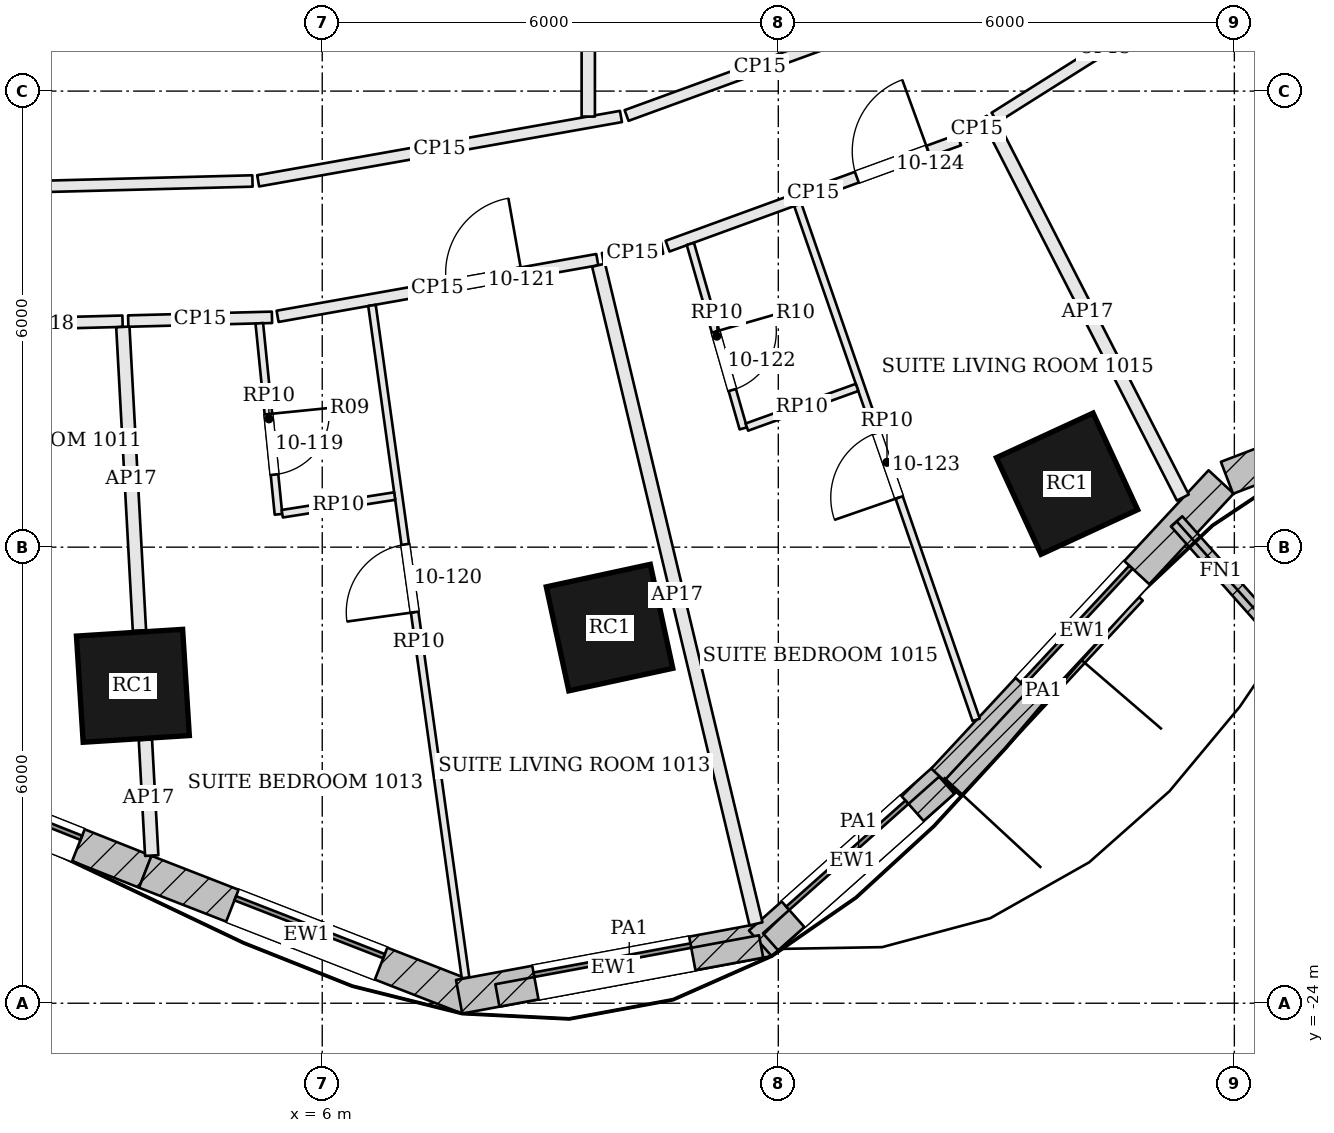
"""IFC4 building model, lengths in metres.
Left out: names, types, materials, properties, quantities, classifications, styles, units other than length and angle.
Written with IfcOpenShell. Run it as: python <this file> out.ifc"""

import sys

from ifc_helpers import new_model, si_unit, direction, frame, frame_2d, origin, origin_2d, place, context, subcontext, project, spatial, rectangle, extrude, element, fill, save


model = new_model("IFC4")
c1 = context("Model", 3, precision=1e-05, world=origin(), true_north=direction((0.0, 1.0)))
c2 = subcontext(c1, "Body", "Model", "MODEL_VIEW")
j1 = project(units=[si_unit("LENGTHUNIT", "METRE"), si_unit("PLANEANGLEUNIT", "RADIAN")], contexts=[c1])
p1 = place(None, origin())
s1 = spatial("IfcSite", under=j1, at=p1, CompositionType="ELEMENT")
p2 = place(p1, origin())
s2 = spatial("IfcBuilding", under=s1, at=p2, CompositionType="ELEMENT")
p3 = place(p2, frame((0.0, 0.0, 51.9)))
s3 = spatial("IfcBuildingStorey", under=s2, at=p3, CompositionType="ELEMENT", Elevation=51.9)
for number, where, z_axis, x_axis in (
    (1, (3.509, -19.824, 0.0), (0.0, 0.0, 1.0), (0.998, 0.063, 0.0)),
    (2, (9.78, -19.058, 0.0), (0.0, 0.0, 1.0), (0.977, 0.211, 0.0)),
    (3, (15.799, -17.165, 0.0), (0.0, 0.0, 1.0), (0.908, 0.419, 0.0)),
):
    element("IfcColumn", number, at=place(p3, frame(where, z_axis=z_axis, x_axis=x_axis)), inside=s3, PredefinedType="COLUMN", context=c2, shape_type="SweptSolid", body=[
        extrude(rectangle(XDim=1.4, YDim=1.4, at=origin_2d()), origin(), (0.0, 0.0, 1.0), 3.6),
    ])
p4 = place(p3, frame((-0.041, -20.798, 0.0), z_axis=(0.0, 0.0, 1.0), x_axis=(0.929539262027, -0.368723148649, 0.0)))
e4 = element("IfcWall", 4, at=p4, inside=s3, PredefinedType="SOLIDWALL", context=c2, shape_type="SweptSolid", body=[
    extrude(rectangle(XDim=3.995, YDim=0.45, at=frame_2d((1.997, 0.0))), origin(), (0.0, 0.0, 1.0), 3.4),
])
p5 = place(p4, frame((0.947, 0.0, 0.9)))
e5 = element("IfcOpeningElement", 5, at=p5, cuts=e4, PredefinedType="OPENING", context=c2, shape_type="SweptSolid", body=[
    extrude(rectangle(XDim=2.1, YDim=2.0, at=frame_2d((1.05, 1.0))), frame((0.0, 0.235, 0.0), z_axis=(0.0, -1.0, 0.0), x_axis=(1.0, 0.0, 0.0)), (0.0, 0.0, 1.0), 0.47),
])
p6 = place(p3, frame((3.672, -22.27, 0.0), z_axis=(0.0, 0.0, 1.0), x_axis=(0.931791503167, -0.36299393194, 0.0)))
e6 = element("IfcWall", 6, at=p6, inside=s3, PredefinedType="SOLIDWALL", context=c2, shape_type="SweptSolid", body=[
    extrude(rectangle(XDim=4.56, YDim=0.45, at=frame_2d((2.28, 0.0))), origin(), (0.0, 0.0, 1.0), 3.4),
])
p7 = place(p6, frame((1.23, 0.0, 0.9)))
e7 = element("IfcOpeningElement", 7, at=p7, cuts=e6, PredefinedType="OPENING", context=c2, shape_type="SweptSolid", body=[
    extrude(rectangle(XDim=2.1, YDim=2.0, at=frame_2d((1.05, 1.0))), frame((0.0, 0.235, 0.0), z_axis=(0.0, -1.0, 0.0), x_axis=(1.0, 0.0, 0.0)), (0.0, 0.0, 1.0), 0.47),
])
p8 = place(p3, frame((7.801, -23.915, 0.0), z_axis=(0.0, 0.0, 1.0), x_axis=(0.983186467795, 0.182604407242, 0.0)))
e8 = element("IfcWall", 8, at=p8, inside=s3, PredefinedType="SOLIDWALL", context=c2, shape_type="SweptSolid", body=[
    extrude(rectangle(XDim=4.141, YDim=0.45, at=frame_2d((2.07, 0.0))), origin(), (0.0, 0.0, 1.0), 3.4),
])
p9 = place(p8, frame((1.02, 0.0, 0.9)))
e9 = element("IfcOpeningElement", 9, at=p9, cuts=e8, PredefinedType="OPENING", context=c2, shape_type="SweptSolid", body=[
    extrude(rectangle(XDim=2.1, YDim=2.0, at=frame_2d((1.05, 1.0))), frame((0.0, 0.235, 0.0), z_axis=(0.0, -1.0, 0.0), x_axis=(1.0, 0.0, 0.0)), (0.0, 0.0, 1.0), 0.47),
])
p10 = place(p3, frame((11.763, -23.212, 0.0), z_axis=(0.0, 0.0, 1.0), x_axis=(0.74723528797, 0.664559571755, 0.0)))
e10 = element("IfcWall", 10, at=p10, inside=s3, PredefinedType="SOLIDWALL", context=c2, shape_type="SweptSolid", body=[
    extrude(rectangle(XDim=3.251, YDim=0.45, at=frame_2d((1.625, 0.0))), origin(), (0.0, 0.0, 1.0), 3.4),
])
p11 = place(p10, frame((0.576, 0.0, 0.9)))
e11 = element("IfcOpeningElement", 11, at=p11, cuts=e10, PredefinedType="OPENING", context=c2, shape_type="SweptSolid", body=[
    extrude(rectangle(XDim=2.1, YDim=2.0, at=frame_2d((1.05, 1.0))), frame((0.0, 0.235, 0.0), z_axis=(0.0, -1.0, 0.0), x_axis=(1.0, 0.0, 0.0)), (0.0, 0.0, 1.0), 0.47),
])
p12 = place(p3, frame((14.177, -21.066, 0.0), z_axis=(0.0, 0.0, 1.0), x_axis=(0.680847709714, 0.732425010617, 0.0)))
e12 = element("IfcWall", 12, at=p12, inside=s3, PredefinedType="SOLIDWALL", context=c2, shape_type="SweptSolid", body=[
    extrude(rectangle(XDim=5.358, YDim=0.45, at=frame_2d((2.679, 0.0))), origin(), (0.0, 0.0, 1.0), 3.4),
])
p13 = place(p12, frame((1.629, 0.0, 0.9)))
e13 = element("IfcOpeningElement", 13, at=p13, cuts=e12, PredefinedType="OPENING", context=c2, shape_type="SweptSolid", body=[
    extrude(rectangle(XDim=2.1, YDim=2.0, at=frame_2d((1.05, 1.0))), frame((0.0, 0.235, 0.0), z_axis=(0.0, -1.0, 0.0), x_axis=(1.0, 0.0, 0.0)), (0.0, 0.0, 1.0), 0.47),
])
p14 = place(p3, frame((17.903, -17.087, 0.0), z_axis=(0.0, 0.0, 1.0), x_axis=(0.934145554025, 0.356892258105, 0.0)))
e14 = element("IfcWall", 14, at=p14, inside=s3, PredefinedType="SOLIDWALL", context=c2, shape_type="SweptSolid", body=[
    extrude(rectangle(XDim=4.165, YDim=0.45, at=frame_2d((2.082, 0.0))), origin(), (0.0, 0.0, 1.0), 3.4),
])
p15 = place(p14, frame((1.032, 0.0, 0.9)))
e15 = element("IfcOpeningElement", 15, at=p15, cuts=e14, PredefinedType="OPENING", context=c2, shape_type="SweptSolid", body=[
    extrude(rectangle(XDim=2.1, YDim=2.0, at=frame_2d((1.05, 1.0))), frame((0.0, 0.235, 0.0), z_axis=(0.0, -1.0, 0.0), x_axis=(1.0, 0.0, 0.0)), (0.0, 0.0, 1.0), 0.47),
])
p16 = place(p3, frame((17.24, -17.66, 0.0), z_axis=(0.0, 0.0, 1.0), x_axis=(0.664017424016, -0.747717099312, 0.0)))
e16 = element("IfcWall", 16, at=p16, inside=s3, PredefinedType="SOLIDWALL", context=c2, shape_type="SweptSolid", body=[
    extrude(rectangle(XDim=1.75, YDim=0.2, at=frame_2d((0.875, 0.0))), origin(), (0.0, 0.0, 1.0), 3.4),
])
p17 = place(p3, frame((8.304, -23.897, 3.6), z_axis=(0.0, 0.0, 1.0), x_axis=(0.983203460001, 0.182512893356, 0.0)))
e17 = element("IfcWall", 17, at=p17, inside=s3, PredefinedType="PARAPET", context=c2, shape_type="SweptSolid", body=[
    extrude(rectangle(XDim=3.529, YDim=0.3, at=frame_2d((1.764, 0.0))), origin(), (0.0, 0.0, 1.0), 1.1),
])
p18 = place(p3, frame((11.898, -23.192, 3.6), z_axis=(0.0, 0.0, 1.0), x_axis=(0.74726596591, 0.664525075669, 0.0)))
e18 = element("IfcWall", 18, at=p18, inside=s3, PredefinedType="PARAPET", context=c2, shape_type="SweptSolid", body=[
    extrude(rectangle(XDim=3.101, YDim=0.3, at=frame_2d((1.551, 0.0))), origin(), (0.0, 0.0, 1.0), 1.1),
])
p19 = place(p3, frame((14.293, -21.174, 3.6), z_axis=(0.0, 0.0, 1.0), x_axis=(0.680821476217, 0.732449395877, 0.0)))
e19 = element("IfcWall", 19, at=p19, inside=s3, PredefinedType="PARAPET", context=c2, shape_type="SweptSolid", body=[
    extrude(rectangle(XDim=3.513, YDim=0.3, at=frame_2d((1.757, 0.0))), origin(), (0.0, 0.0, 1.0), 1.1),
])
p20 = place(p3, frame((-2.114, -15.17, 0.0), z_axis=(0.0, 0.0, 1.0), x_axis=(0.999662545619, 0.025976814392, 0.0)))
e20 = element("IfcWall", 20, at=p20, inside=s3, PredefinedType="PARTITIONING", context=c2, shape_type="SweptSolid", body=[
    extrude(rectangle(XDim=5.489, YDim=0.15, at=frame_2d((2.744, 0.0))), origin(), (0.0, 0.0, 1.0), 2.68),
])
p21 = place(p20, frame((3.402, 0.0, 0.0)))
e21 = element("IfcOpeningElement", 21, at=p21, cuts=e20, PredefinedType="OPENING", context=c2, shape_type="SweptSolid", body=[
    extrude(rectangle(XDim=1.0, YDim=2.1, at=frame_2d((0.5, 1.05))), frame((0.0, 0.085, 0.0), z_axis=(0.0, -1.0, 0.0), x_axis=(1.0, 0.0, 0.0)), (0.0, 0.0, 1.0), 0.17),
])
p22 = place(p3, frame((3.757, -22.058, 0.0), z_axis=(0.0, 0.0, 1.0), x_axis=(-0.054592188309, 0.998508734552, 0.0)))
e22 = element("IfcWall", 22, at=p22, inside=s3, PredefinedType="PARTITIONING", context=c2, shape_type="SweptSolid", body=[
    extrude(rectangle(XDim=1.525, YDim=0.175, at=frame_2d((0.762, 0.0))), origin(), (0.0, 0.0, 1.0), 2.68),
])
p23 = place(p3, frame((3.595, -19.097, 0.0), z_axis=(0.0, 0.0, 1.0), x_axis=(-0.054614936385, 0.99850749057, 0.0)))
e23 = element("IfcWall", 23, at=p23, inside=s3, PredefinedType="PARTITIONING", context=c2, shape_type="SweptSolid", body=[
    extrude(rectangle(XDim=4.001, YDim=0.175, at=frame_2d((2.0, 0.0))), origin(), (0.0, 0.0, 1.0), 2.68),
])
p24 = place(p3, frame((3.448, -15.025, 0.0), z_axis=(0.0, 0.0, 1.0), x_axis=(0.999663410965, 0.025943492008, 0.0)))
e24 = element("IfcWall", 24, at=p24, inside=s3, PredefinedType="PARTITIONING", context=c2, shape_type="SweptSolid", body=[
    extrude(rectangle(XDim=1.892, YDim=0.15, at=frame_2d((0.946, 0.0))), origin(), (0.0, 0.0, 1.0), 2.68),
])
p25 = place(p3, frame((5.413, -14.963, 0.0), z_axis=(0.0, 0.0, 1.0), x_axis=(0.984637058407, 0.174613468012, 0.0)))
e25 = element("IfcWall", 25, at=p25, inside=s3, PredefinedType="PARTITIONING", context=c2, shape_type="SweptSolid", body=[
    extrude(rectangle(XDim=4.271, YDim=0.15, at=frame_2d((2.136, 0.0))), origin(), (0.0, 0.0, 1.0), 2.68),
])
p26 = place(p25, frame((2.261, 0.0, 0.0)))
e26 = element("IfcOpeningElement", 26, at=p26, cuts=e25, PredefinedType="OPENING", context=c2, shape_type="SweptSolid", body=[
    extrude(rectangle(XDim=1.0, YDim=2.1, at=frame_2d((0.5, 1.05))), frame((0.0, 0.085, 0.0), z_axis=(0.0, -1.0, 0.0), x_axis=(1.0, 0.0, 0.0)), (0.0, 0.0, 1.0), 0.17),
])
p27 = place(p3, frame((11.707, -22.956, 0.0), z_axis=(0.0, 0.0, 1.0), x_axis=(-0.232387269729, 0.972623337612, 0.0)))
e27 = element("IfcWall", 27, at=p27, inside=s3, PredefinedType="PARTITIONING", context=c2, shape_type="SweptSolid", body=[
    extrude(rectangle(XDim=8.91, YDim=0.175, at=frame_2d((4.455, 0.0))), origin(), (0.0, 0.0, 1.0), 2.68),
])
p28 = place(p3, frame((9.692, -14.204, 0.0), z_axis=(0.0, 0.0, 1.0), x_axis=(0.984624975399, 0.174681589816, 0.0)))
e28 = element("IfcWall", 28, at=p28, inside=s3, PredefinedType="PARTITIONING", context=c2, shape_type="SweptSolid", body=[
    extrude(rectangle(XDim=0.792, YDim=0.15, at=frame_2d((0.396, 0.0))), origin(), (0.0, 0.0, 1.0), 2.68),
])
p29 = place(p3, frame((10.543, -14.04, 0.0), z_axis=(0.0, 0.0, 1.0), x_axis=(0.939576705301, 0.342338450741, 0.0)))
e29 = element("IfcWall", 29, at=p29, inside=s3, PredefinedType="PARTITIONING", context=c2, shape_type="SweptSolid", body=[
    extrude(rectangle(XDim=4.082, YDim=0.15, at=frame_2d((2.041, 0.0))), origin(), (0.0, 0.0, 1.0), 2.68),
])
p30 = place(p29, frame((2.65, 0.0, 0.0)))
e30 = element("IfcOpeningElement", 30, at=p30, cuts=e29, PredefinedType="OPENING", context=c2, shape_type="SweptSolid", body=[
    extrude(rectangle(XDim=1.0, YDim=2.1, at=frame_2d((0.5, 1.05))), frame((0.0, 0.085, 0.0), z_axis=(0.0, -1.0, 0.0), x_axis=(1.0, 0.0, 0.0)), (0.0, 0.0, 1.0), 0.17),
])
p31 = place(p3, frame((14.442, -12.603, 0.0), z_axis=(0.0, 0.0, 1.0), x_axis=(0.845806400094, 0.533489956381, 0.0)))
e31 = element("IfcWall", 31, at=p31, inside=s3, PredefinedType="PARTITIONING", context=c2, shape_type="SweptSolid", body=[
    extrude(rectangle(XDim=0.402, YDim=0.15, at=frame_2d((0.201, 0.0))), origin(), (0.0, 0.0, 1.0), 2.68),
])
p32 = place(p3, frame((17.322, -17.347, 0.0), z_axis=(0.0, 0.0, 1.0), x_axis=(-0.455844974843, 0.890059188431, 0.0)))
e32 = element("IfcWall", 32, at=p32, inside=s3, PredefinedType="PARTITIONING", context=c2, shape_type="SweptSolid", body=[
    extrude(rectangle(XDim=5.497, YDim=0.175, at=frame_2d((2.748, 0.0))), origin(), (0.0, 0.0, 1.0), 2.68),
])
p33 = place(p3, frame((14.846, -12.348, 0.0), z_axis=(0.0, 0.0, 1.0), x_axis=(0.846001508251, 0.533180502304, 0.0)))
e33 = element("IfcWall", 33, at=p33, inside=s3, PredefinedType="PARTITIONING", context=c2, shape_type="SweptSolid", body=[
    extrude(rectangle(XDim=3.438, YDim=0.15, at=frame_2d((1.719, 0.0))), origin(), (0.0, 0.0, 1.0), 2.68),
])
p34 = place(p33, frame((2.0, 0.0, 0.0)))
e34 = element("IfcOpeningElement", 34, at=p34, cuts=e33, PredefinedType="OPENING", context=c2, shape_type="SweptSolid", body=[
    extrude(rectangle(XDim=1.0, YDim=2.4, at=frame_2d((0.5, 1.2))), frame((0.0, 0.085, 0.0), z_axis=(0.0, -1.0, 0.0), x_axis=(1.0, 0.0, 0.0)), (0.0, 0.0, 1.0), 0.17),
])
p35 = place(p3, frame((13.511, -11.043, 0.0), z_axis=(0.0, 0.0, 1.0), x_axis=(-0.939583191704, -0.342320647736, 0.0)))
e35 = element("IfcWall", 35, at=p35, inside=s3, PredefinedType="PARTITIONING", context=c2, shape_type="SweptSolid", body=[
    extrude(rectangle(XDim=3.733, YDim=0.15, at=frame_2d((1.866, 0.0))), origin(), (0.0, 0.0, 1.0), 2.68),
])
p36 = place(p3, frame((9.93, -12.334, 0.0), z_axis=(0.0, 0.0, 1.0), x_axis=(-0.984638212434, -0.174606960386, 0.0)))
e36 = element("IfcWall", 36, at=p36, inside=s3, PredefinedType="PARTITIONING", context=c2, shape_type="SweptSolid", body=[
    extrude(rectangle(XDim=4.848, YDim=0.15, at=frame_2d((2.424, 0.0))), origin(), (0.0, 0.0, 1.0), 2.68),
])
p37 = place(p3, frame((5.082, -13.182, 0.0), z_axis=(0.0, 0.0, 1.0), x_axis=(-0.999661624383, -0.026012242045, 0.0)))
e37 = element("IfcWall", 37, at=p37, inside=s3, PredefinedType="PARTITIONING", context=c2, shape_type="SweptSolid", body=[
    extrude(rectangle(XDim=7.218, YDim=0.15, at=frame_2d((3.609, 0.0))), origin(), (0.0, 0.0, 1.0), 2.68),
])
p38 = place(p3, frame((7.885, -23.666, 0.0), z_axis=(0.0, 0.0, 1.0), x_axis=(-0.137792588261, 0.990461106061, 0.0)))
e38 = element("IfcWall", 38, at=p38, inside=s3, PredefinedType="PARTITIONING", context=c2, shape_type="SweptSolid", body=[
    extrude(rectangle(XDim=8.932, YDim=0.1, at=frame_2d((4.466, 0.0))), origin(), (0.0, 0.0, 1.0), 2.898),
])
p39 = place(p38, frame((4.857, 0.0, 0.0)))
e39 = element("IfcOpeningElement", 39, at=p39, cuts=e38, PredefinedType="OPENING", context=c2, shape_type="SweptSolid", body=[
    extrude(rectangle(XDim=0.9, YDim=2.4, at=frame_2d((0.45, 1.2))), frame((0.0, 0.06, 0.0), z_axis=(0.0, -1.0, 0.0), x_axis=(1.0, 0.0, 0.0)), (0.0, 0.0, 1.0), 0.12),
])
p40 = place(p3, frame((5.172, -15.055, 0.0), z_axis=(0.0, 0.0, 1.0), x_axis=(0.099972776087, -0.994990172837, 0.0)))
e40 = element("IfcWall", 40, at=p40, inside=s3, PredefinedType="PARTITIONING", context=c2, shape_type="SweptSolid", body=[
    extrude(rectangle(XDim=2.525, YDim=0.1, at=frame_2d((1.263, 0.0))), origin(), (0.0, 0.0, 1.0), 2.898),
])
p41 = place(p40, frame((1.2, 0.0, 0.0)))
e41 = element("IfcOpeningElement", 41, at=p41, cuts=e40, PredefinedType="OPENING", context=c2, shape_type="SweptSolid", body=[
    extrude(rectangle(XDim=0.8, YDim=2.1, at=frame_2d((0.4, 1.05))), frame((0.0, 0.06, 0.0), z_axis=(0.0, -1.0, 0.0), x_axis=(1.0, 0.0, 0.0)), (0.0, 0.0, 1.0), 0.12),
])
p42 = place(p3, frame((5.474, -17.56, 0.0), z_axis=(0.0, 0.0, 1.0), x_axis=(0.987901407122, 0.15508323509, 0.0)))
e42 = element("IfcWall", 42, at=p42, inside=s3, PredefinedType="PARTITIONING", context=c2, shape_type="SweptSolid", body=[
    extrude(rectangle(XDim=1.497, YDim=0.1, at=frame_2d((0.749, 0.0))), origin(), (0.0, 0.0, 1.0), 2.898),
])
p43 = place(p3, frame((14.603, -20.272, 0.0), z_axis=(0.0, 0.0, 1.0), x_axis=(-0.327236845349, 0.944942351176, 0.0)))
e43 = element("IfcWall", 43, at=p43, inside=s3, PredefinedType="PARTITIONING", context=c2, shape_type="SweptSolid", body=[
    extrude(rectangle(XDim=7.171, YDim=0.1, at=frame_2d((3.585, 0.0))), origin(), (0.0, 0.0, 1.0), 2.898),
])
p44 = place(p43, frame((3.096, 0.0, 0.0)))
e44 = element("IfcOpeningElement", 44, at=p44, cuts=e43, PredefinedType="OPENING", context=c2, shape_type="SweptSolid", body=[
    extrude(rectangle(XDim=0.9, YDim=2.4, at=frame_2d((0.45, 1.2))), frame((0.0, 0.06, 0.0), z_axis=(0.0, -1.0, 0.0), x_axis=(1.0, 0.0, 0.0)), (0.0, 0.0, 1.0), 0.12),
])
p45 = place(p3, frame((10.843, -14.01, 0.0), z_axis=(0.0, 0.0, 1.0), x_axis=(0.275653202558, -0.961257151817, 0.0)))
e45 = element("IfcWall", 45, at=p45, inside=s3, PredefinedType="PARTITIONING", context=c2, shape_type="SweptSolid", body=[
    extrude(rectangle(XDim=2.525, YDim=0.1, at=frame_2d((1.263, 0.0))), origin(), (0.0, 0.0, 1.0), 2.898),
])
p46 = place(p45, frame((1.2, 0.0, 0.0)))
e46 = element("IfcOpeningElement", 46, at=p46, cuts=e45, PredefinedType="OPENING", context=c2, shape_type="SweptSolid", body=[
    extrude(rectangle(XDim=0.8, YDim=2.1, at=frame_2d((0.4, 1.05))), frame((0.0, 0.06, 0.0), z_axis=(0.0, -1.0, 0.0), x_axis=(1.0, 0.0, 0.0)), (0.0, 0.0, 1.0), 0.12),
])
p47 = place(p3, frame((11.586, -16.421, 0.0), z_axis=(0.0, 0.0, 1.0), x_axis=(0.940820740846, 0.338904608398, 0.0)))
e47 = element("IfcWall", 47, at=p47, inside=s3, PredefinedType="PARTITIONING", context=c2, shape_type="SweptSolid", body=[
    extrude(rectangle(XDim=1.541, YDim=0.1, at=frame_2d((0.771, 0.0))), origin(), (0.0, 0.0, 1.0), 2.898),
])
p48 = place(p3, frame((9.5, -12.335, 0.0), z_axis=(0.0, 0.0, 1.0), x_axis=(0.0, 1.0, 0.0)))
e48 = element("IfcWall", 48, at=p48, inside=s3, PredefinedType="PARTITIONING", context=c2, shape_type="SweptSolid", body=[
    extrude(rectangle(XDim=7.46, YDim=0.175, at=frame_2d((3.73, 0.0))), origin(), (0.0, 0.0, 1.0), 2.68),
])
p49 = place(p5, origin())
e49 = element("IfcWindow", 49, at=p49, inside=s3, PartitioningType="SINGLE_PANEL", PredefinedType="WINDOW", context=c2, shape_type="SweptSolid", body=[
    extrude(rectangle(XDim=2.1, YDim=2.0, at=frame_2d((1.05, 1.0))), frame((0.0, 0.135, 0.0), z_axis=(0.0, -1.0, 0.0), x_axis=(1.0, 0.0, 0.0)), (0.0, 0.0, 1.0), 0.06),
])
fill(e5, e49)
p50 = place(p7, origin())
e50 = element("IfcWindow", 50, at=p50, inside=s3, PartitioningType="SINGLE_PANEL", PredefinedType="WINDOW", context=c2, shape_type="SweptSolid", body=[
    extrude(rectangle(XDim=2.1, YDim=2.0, at=frame_2d((1.05, 1.0))), frame((0.0, 0.135, 0.0), z_axis=(0.0, -1.0, 0.0), x_axis=(1.0, 0.0, 0.0)), (0.0, 0.0, 1.0), 0.06),
])
fill(e7, e50)
p51 = place(p9, origin())
e51 = element("IfcWindow", 51, at=p51, inside=s3, PartitioningType="SINGLE_PANEL", PredefinedType="WINDOW", context=c2, shape_type="SweptSolid", body=[
    extrude(rectangle(XDim=2.1, YDim=2.0, at=frame_2d((1.05, 1.0))), frame((0.0, 0.135, 0.0), z_axis=(0.0, -1.0, 0.0), x_axis=(1.0, 0.0, 0.0)), (0.0, 0.0, 1.0), 0.06),
])
fill(e9, e51)
p52 = place(p11, origin())
e52 = element("IfcWindow", 52, at=p52, inside=s3, PartitioningType="SINGLE_PANEL", PredefinedType="WINDOW", context=c2, shape_type="SweptSolid", body=[
    extrude(rectangle(XDim=2.1, YDim=2.0, at=frame_2d((1.05, 1.0))), frame((0.0, 0.135, 0.0), z_axis=(0.0, -1.0, 0.0), x_axis=(1.0, 0.0, 0.0)), (0.0, 0.0, 1.0), 0.06),
])
fill(e11, e52)
p53 = place(p13, origin())
e53 = element("IfcWindow", 53, at=p53, inside=s3, PartitioningType="SINGLE_PANEL", PredefinedType="WINDOW", context=c2, shape_type="SweptSolid", body=[
    extrude(rectangle(XDim=2.1, YDim=2.0, at=frame_2d((1.05, 1.0))), frame((0.0, 0.135, 0.0), z_axis=(0.0, -1.0, 0.0), x_axis=(1.0, 0.0, 0.0)), (0.0, 0.0, 1.0), 0.06),
])
fill(e13, e53)
p54 = place(p41, origin())
e54 = element("IfcDoor", 54, at=p54, inside=s3, OperationType="SINGLE_SWING_LEFT", PredefinedType="DOOR", context=c2, shape_type="SweptSolid", body=[
    extrude(rectangle(XDim=0.8, YDim=2.1, at=frame_2d((0.4, 1.05))), frame((0.0, 0.025, 0.0), z_axis=(0.0, -1.0, 0.0), x_axis=(1.0, 0.0, 0.0)), (0.0, 0.0, 1.0), 0.05),
])
fill(e41, e54)
p55 = place(p39, origin())
e55 = element("IfcDoor", 55, at=p55, inside=s3, OperationType="SINGLE_SWING_LEFT", PredefinedType="DOOR", context=c2, shape_type="SweptSolid", body=[
    extrude(rectangle(XDim=0.9, YDim=2.4, at=frame_2d((0.45, 1.2))), frame((0.0, 0.025, 0.0), z_axis=(0.0, -1.0, 0.0), x_axis=(1.0, 0.0, 0.0)), (0.0, 0.0, 1.0), 0.05),
])
fill(e39, e55)
p56 = place(p26, origin())
e56 = element("IfcDoor", 56, at=p56, inside=s3, OperationType="SINGLE_SWING_RIGHT", PredefinedType="DOOR", context=c2, shape_type="SweptSolid", body=[
    extrude(rectangle(XDim=1.0, YDim=2.1, at=frame_2d((0.5, 1.05))), frame((0.0, 0.025, 0.0), z_axis=(0.0, -1.0, 0.0), x_axis=(1.0, 0.0, 0.0)), (0.0, 0.0, 1.0), 0.05),
])
fill(e26, e56)
p57 = place(p46, origin())
e57 = element("IfcDoor", 57, at=p57, inside=s3, OperationType="SINGLE_SWING_LEFT", PredefinedType="DOOR", context=c2, shape_type="SweptSolid", body=[
    extrude(rectangle(XDim=0.8, YDim=2.1, at=frame_2d((0.4, 1.05))), frame((0.0, 0.025, 0.0), z_axis=(0.0, -1.0, 0.0), x_axis=(1.0, 0.0, 0.0)), (0.0, 0.0, 1.0), 0.05),
])
fill(e46, e57)
p58 = place(p44, origin())
e58 = element("IfcDoor", 58, at=p58, inside=s3, OperationType="SINGLE_SWING_LEFT", PredefinedType="DOOR", context=c2, shape_type="SweptSolid", body=[
    extrude(rectangle(XDim=0.9, YDim=2.4, at=frame_2d((0.45, 1.2))), frame((0.0, 0.025, 0.0), z_axis=(0.0, -1.0, 0.0), x_axis=(1.0, 0.0, 0.0)), (0.0, 0.0, 1.0), 0.05),
])
fill(e44, e58)
p59 = place(p30, origin())
e59 = element("IfcDoor", 59, at=p59, inside=s3, OperationType="SINGLE_SWING_RIGHT", PredefinedType="DOOR", context=c2, shape_type="SweptSolid", body=[
    extrude(rectangle(XDim=1.0, YDim=2.1, at=frame_2d((0.5, 1.05))), frame((0.0, 0.025, 0.0), z_axis=(0.0, -1.0, 0.0), x_axis=(1.0, 0.0, 0.0)), (0.0, 0.0, 1.0), 0.05),
])
fill(e30, e59)
save(model, sys.argv[1])
